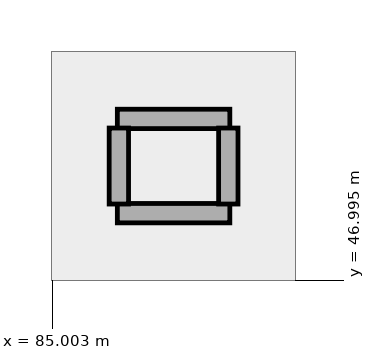
"""IFC4 building model, lengths in metres.
Left out: names, types, materials, properties, quantities, classifications, styles, units other than length and angle.
Written with IfcOpenShell. Run it as: python <this file> out.ifc"""

import sys

from ifc_helpers import new_model, si_unit, direction, frame, frame_2d, origin, place, context, subcontext, project, spatial, rectangle, extrude, element, save


model = new_model("IFC4")
c1 = context("Model", 3, precision=1e-05, world=origin(), true_north=direction((0.0, 1.0)))
c2 = subcontext(c1, "Body", "Model", "MODEL_VIEW")
j1 = project(units=[si_unit("LENGTHUNIT", "METRE"), si_unit("PLANEANGLEUNIT", "RADIAN")], contexts=[c1])
p1 = place(None, origin())
s1 = spatial("IfcSite", under=j1, at=p1, CompositionType="ELEMENT")
p2 = place(p1, origin())
s2 = spatial("IfcBuilding", under=s1, at=p2, CompositionType="ELEMENT")
p3 = place(p2, frame((0.0, 0.0, 15.6)))
s3 = spatial("IfcBuildingStorey", under=s2, at=p3, CompositionType="ELEMENT", Elevation=15.6)
for number, where, z_axis, x_axis in (
    (1, (85.86, 49.12, 0.0), (0.0, 0.0, 1.0), (1.0, 0.0, 0.0)),
    (2, (85.86, 47.88, 0.0), (0.0, 0.0, 1.0), (1.0, 0.0, 0.0)),
):
    element("IfcWall", number, at=place(p3, frame(where, z_axis=z_axis, x_axis=x_axis)), inside=s3, PredefinedType="PARTITIONING", context=c2, shape_type="SweptSolid", body=[
        extrude(rectangle(XDim=1.48, YDim=0.255, at=frame_2d((0.74, 0.0))), origin(), (0.0, 0.0, 1.0), 4.72),
    ])
for number, where, z_axis, x_axis in (
    (3, (85.88, 48.0, 0.0), (0.0, 0.0, 1.0), (0.0, 1.0, 0.0)),
    (4, (87.32, 48.0, 0.0), (0.0, 0.0, 1.0), (0.0, 1.0, 0.0)),
):
    element("IfcWall", number, at=place(p3, frame(where, z_axis=z_axis, x_axis=x_axis)), inside=s3, PredefinedType="PARTITIONING", context=c2, shape_type="SweptSolid", body=[
        extrude(rectangle(XDim=1.0, YDim=0.255, at=frame_2d((0.5, 0.0))), origin(), (0.0, 0.0, 1.0), 4.72),
    ])
save(model, sys.argv[1])
